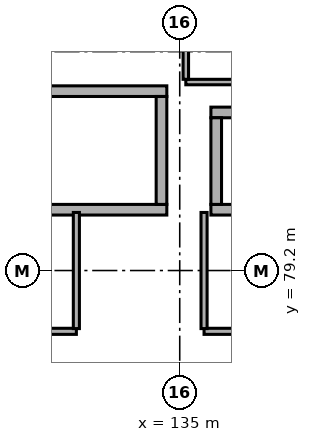
"""IFC4 building model, lengths in metres.
Left out: names, types, materials, properties, quantities, classifications, styles, units other than length and angle.
Written with IfcOpenShell. Run it as: python <this file> out.ifc"""

import sys

from ifc_helpers import new_model, si_unit, direction, frame, frame_2d, origin, origin_2d, place, context, subcontext, project, spatial, rectangle, hollow_rectangle, extrude, element, save


model = new_model("IFC4")
c1 = context("Model", 3, precision=1e-05, world=origin(), true_north=direction((0.0, 1.0)))
c2 = subcontext(c1, "Body", "Model", "MODEL_VIEW")
j1 = project(units=[si_unit("LENGTHUNIT", "METRE"), si_unit("PLANEANGLEUNIT", "RADIAN")], contexts=[c1])
p1 = place(None, origin())
s1 = spatial("IfcSite", under=j1, at=p1, CompositionType="ELEMENT")
p2 = place(p1, origin())
s2 = spatial("IfcBuilding", under=s1, at=p2, CompositionType="ELEMENT")
p3 = place(p2, origin())
s3 = spatial("IfcBuildingStorey", under=s2, at=p3, CompositionType="ELEMENT", Elevation=0.0)
for number, where, z_axis, x_axis in (
    (1, (135.0, 79.2, 0.0), (0.0, 0.0, 1.0), (1.0, 0.0, 0.0)),
    (2, (135.0, 86.4, 0.0), (0.0, 0.0, 1.0), (1.0, 0.0, 0.0)),
):
    element("IfcColumn", number, at=place(p3, frame(where, z_axis=z_axis, x_axis=x_axis)), inside=s3, PredefinedType="COLUMN", context=c2, shape_type="SweptSolid", body=[
        extrude(hollow_rectangle(XDim=0.75, YDim=0.75, WallThickness=0.032, at=origin_2d()), origin(), (0.0, 0.0, 1.0), 4.8),
    ])
p4 = place(p3, frame((126.425, 81.2, 0.0), z_axis=(0.0, 0.0, 1.0), x_axis=(1.0, 0.0, 0.0)))
e3 = element("IfcWall", 3, at=p4, inside=s3, PredefinedType="SHEAR", context=c2, shape_type="SweptSolid", body=[
    extrude(rectangle(XDim=8.15, YDim=0.35, at=frame_2d((4.075, 0.0))), origin(), (0.0, 0.0, 1.0), 4.555),
])
p5 = place(p4, frame((0.525, 0.0, 0.0)))
e4 = element("IfcOpeningElement", 4, at=p5, cuts=e3, PredefinedType="OPENING", context=c2, shape_type="SweptSolid", body=[
    extrude(rectangle(XDim=1.15, YDim=2.1, at=frame_2d((0.575, 1.05))), frame((0.0, 0.187, 0.0), z_axis=(0.0, -1.0, 0.0), x_axis=(1.0, 0.0, 0.0)), (0.0, 0.0, 1.0), 0.374),
])
p6 = place(p3, frame((126.425, 85.1, 0.0), z_axis=(0.0, 0.0, 1.0), x_axis=(1.0, 0.0, 0.0)))
e5 = element("IfcWall", 5, at=p6, inside=s3, PredefinedType="SHEAR", context=c2, shape_type="SweptSolid", body=[
    extrude(rectangle(XDim=8.15, YDim=0.35, at=frame_2d((4.075, 0.0))), origin(), (0.0, 0.0, 1.0), 4.555),
])
p7 = place(p3, frame((134.4, 81.375, 0.0), z_axis=(0.0, 0.0, 1.0), x_axis=(0.0, 1.0, 0.0)))
e6 = element("IfcWall", 6, at=p7, inside=s3, PredefinedType="SHEAR", context=c2, shape_type="SweptSolid", body=[
    extrude(rectangle(XDim=3.55, YDim=0.35, at=frame_2d((1.775, 0.0))), origin(), (0.0, 0.0, 1.0), 4.555),
])
p8 = place(p3, frame((136.025, 81.2, 0.0), z_axis=(0.0, 0.0, 1.0), x_axis=(1.0, 0.0, 0.0)))
e7 = element("IfcWall", 7, at=p8, inside=s3, PredefinedType="SHEAR", context=c2, shape_type="SweptSolid", body=[
    extrude(rectangle(XDim=2.75, YDim=0.35, at=frame_2d((1.375, 0.0))), origin(), (0.0, 0.0, 1.0), 4.555),
])
p9 = place(p8, frame((0.8, 0.0, 0.0)))
e8 = element("IfcOpeningElement", 8, at=p9, cuts=e7, PredefinedType="OPENING", context=c2, shape_type="SweptSolid", body=[
    extrude(rectangle(XDim=1.15, YDim=2.12, at=frame_2d((0.575, 1.06))), frame((0.0, 0.187, 0.0), z_axis=(0.0, -1.0, 0.0), x_axis=(1.0, 0.0, 0.0)), (0.0, 0.0, 1.0), 0.374),
])
p10 = place(p3, frame((136.025, 84.4, 0.0), z_axis=(0.0, 0.0, 1.0), x_axis=(1.0, 0.0, 0.0)))
e9 = element("IfcWall", 9, at=p10, inside=s3, PredefinedType="SHEAR", context=c2, shape_type="SweptSolid", body=[
    extrude(rectangle(XDim=2.75, YDim=0.35, at=frame_2d((1.375, 0.0))), origin(), (0.0, 0.0, 1.0), 4.555),
])
p11 = place(p3, frame((136.2, 81.375, 0.0), z_axis=(0.0, 0.0, 1.0), x_axis=(0.0, 1.0, 0.0)))
e10 = element("IfcWall", 10, at=p11, inside=s3, PredefinedType="SHEAR", context=c2, shape_type="SweptSolid", body=[
    extrude(rectangle(XDim=2.85, YDim=0.35, at=frame_2d((1.425, 0.0))), origin(), (0.0, 0.0, 1.0), 4.555),
])
p12 = place(p3, frame((126.6, 77.2, 0.0), z_axis=(0.0, 0.0, 1.0), x_axis=(1.0, 0.0, 0.0)))
e11 = element("IfcWall", 11, at=p12, inside=s3, PredefinedType="PARTITIONING", context=c2, shape_type="SweptSolid", body=[
    extrude(rectangle(XDim=5.0, YDim=0.2, at=frame_2d((2.5, 0.0))), origin(), (0.0, 0.0, 1.0), 4.555),
])
p13 = place(p12, frame((1.95, 0.0, 0.0)))
e12 = element("IfcOpeningElement", 12, at=p13, cuts=e11, PredefinedType="OPENING", context=c2, shape_type="SweptSolid", body=[
    extrude(rectangle(XDim=1.1, YDim=2.08, at=frame_2d((0.55, 1.04))), frame((0.0, 0.112, 0.0), z_axis=(0.0, -1.0, 0.0), x_axis=(1.0, 0.0, 0.0)), (0.0, 0.0, 1.0), 0.224),
])
p14 = place(p3, frame((131.6, 77.29, 0.0), z_axis=(0.0, 0.0, 1.0), x_axis=(0.0, 1.0, 0.0)))
e13 = element("IfcWall", 13, at=p14, inside=s3, PredefinedType="PARTITIONING", context=c2, shape_type="SweptSolid", body=[
    extrude(rectangle(XDim=3.82, YDim=0.2, at=frame_2d((1.91, 0.0))), origin(), (0.0, 0.0, 1.0), 4.555),
])
p15 = place(p3, frame((135.8, 77.2, 0.0), z_axis=(0.0, 0.0, 1.0), x_axis=(1.0, 0.0, 0.0)))
e14 = element("IfcWall", 14, at=p15, inside=s3, PredefinedType="PARTITIONING", context=c2, shape_type="SweptSolid", body=[
    extrude(rectangle(XDim=7.8, YDim=0.2, at=frame_2d((3.9, 0.0))), origin(), (0.0, 0.0, 1.0), 4.555),
])
p16 = place(p15, frame((3.1, 0.0, 0.0)))
e15 = element("IfcOpeningElement", 15, at=p16, cuts=e14, PredefinedType="OPENING", context=c2, shape_type="SweptSolid", body=[
    extrude(rectangle(XDim=1.2, YDim=2.1, at=frame_2d((0.6, 1.05))), frame((0.0, 0.112, 0.0), z_axis=(0.0, -1.0, 0.0), x_axis=(1.0, 0.0, 0.0)), (0.0, 0.0, 1.0), 0.224),
])
p17 = place(p3, frame((135.8, 77.29, 0.0), z_axis=(0.0, 0.0, 1.0), x_axis=(0.0, 1.0, 0.0)))
e16 = element("IfcWall", 16, at=p17, inside=s3, PredefinedType="PARTITIONING", context=c2, shape_type="SweptSolid", body=[
    extrude(rectangle(XDim=3.82, YDim=0.2, at=frame_2d((1.91, 0.0))), origin(), (0.0, 0.0, 1.0), 4.555),
])
p18 = place(p3, frame((135.2, 85.4, 0.0), z_axis=(0.0, 0.0, 1.0), x_axis=(1.0, 0.0, 0.0)))
e17 = element("IfcWall", 17, at=p18, inside=s3, PredefinedType="PARTITIONING", context=c2, shape_type="SweptSolid", body=[
    extrude(rectangle(XDim=18.0, YDim=0.18, at=frame_2d((9.0, 0.0))), origin(), (0.0, 0.0, 1.0), 4.555),
])
p19 = place(p3, frame((135.2, 85.49, 0.0), z_axis=(0.0, 0.0, 1.0), x_axis=(0.0, 1.0, 0.0)))
e18 = element("IfcWall", 18, at=p19, inside=s3, PredefinedType="PARTITIONING", context=c2, shape_type="SweptSolid", body=[
    extrude(rectangle(XDim=7.51, YDim=0.18, at=frame_2d((3.755, 0.0))), origin(), (0.0, 0.0, 1.0), 3.835),
])
p20 = place(p19, frame((3.52, 0.0, 0.0)))
e19 = element("IfcOpeningElement", 19, at=p20, cuts=e18, PredefinedType="OPENING", context=c2, shape_type="SweptSolid", body=[
    extrude(rectangle(XDim=0.98, YDim=2.02, at=frame_2d((0.49, 1.01))), frame((0.0, 0.102, 0.0), z_axis=(0.0, -1.0, 0.0), x_axis=(1.0, 0.0, 0.0)), (0.0, 0.0, 1.0), 0.204),
])
save(model, sys.argv[1])
